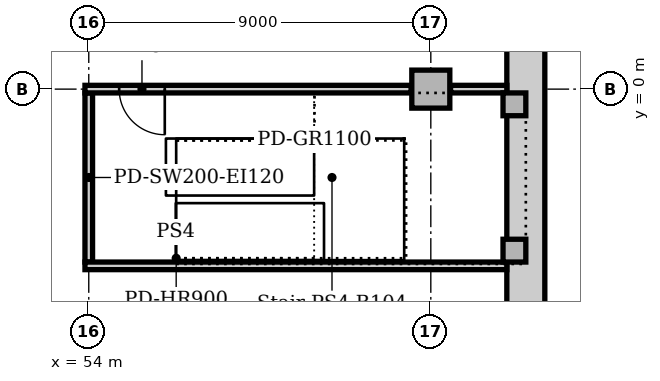
"""IFC4 building model, lengths in metres.
Left out: names, types, materials, properties, quantities, classifications, styles, units other than length and angle.
Written with IfcOpenShell. Run it as: python <this file> out.ifc"""

import sys

from ifc_helpers import new_model, si_unit, direction, frame, frame_2d, origin, origin_2d, place, context, subcontext, project, spatial, rectangle, extrude, element, fill, save


model = new_model("IFC4")
c1 = context("Model", 3, precision=1e-05, world=origin(), true_north=direction((0.0, 1.0)))
c2 = subcontext(c1, "Body", "Model", "MODEL_VIEW")
j1 = project(units=[si_unit("LENGTHUNIT", "METRE"), si_unit("PLANEANGLEUNIT", "RADIAN")], contexts=[c1])
p1 = place(None, origin())
s1 = spatial("IfcSite", under=j1, at=p1, CompositionType="ELEMENT")
p2 = place(p1, origin())
s2 = spatial("IfcBuilding", under=s1, at=p2, CompositionType="ELEMENT")
p3 = place(p2, frame((0.0, 0.0, -5.0)))
s3 = spatial("IfcBuildingStorey", under=s2, at=p3, CompositionType="ELEMENT", Elevation=-5.0)
p4 = place(p3, frame((65.5, 53.641, 0.0), z_axis=(0.0, 0.0, 1.0), x_axis=(0.0, -1.0, 0.0)))
e1 = element("IfcWall", 1, at=p4, inside=s3, PredefinedType="SOLIDWALL", context=c2, shape_type="SweptSolid", body=[
    extrude(rectangle(XDim=62.282, YDim=1.0, at=frame_2d((31.141, 0.0))), origin(), (0.0, 0.0, 1.0), 4.7),
])
p5 = place(p3, frame((63.0, 0.0, 0.0), z_axis=(0.0, 0.0, 1.0), x_axis=(1.0, 0.0, 0.0)))
e2 = element("IfcColumn", 2, at=p5, inside=s3, PredefinedType="COLUMN", context=c2, shape_type="SweptSolid", body=[
    extrude(rectangle(XDim=1.0, YDim=1.0, at=origin_2d()), origin(), (0.0, 0.0, 1.0), 4.7),
])
for number, where, z_axis, x_axis in (
    (3, (65.2, -4.25, 0.0), (0.0, 0.0, 1.0), (1.0, 0.0, 0.0)),
    (4, (65.2, -0.4, 0.0), (0.0, 0.0, 1.0), (1.0, 0.0, 0.0)),
):
    element("IfcColumn", number, at=place(p3, frame(where, z_axis=z_axis, x_axis=x_axis)), inside=s3, PredefinedType="COLUMN", context=c2, shape_type="SweptSolid", body=[
        extrude(rectangle(XDim=0.6, YDim=0.6, at=origin_2d()), origin(), (0.0, 0.0, 1.0), 5.0),
    ])
p6 = place(p3, frame((54.0, -4.55, 0.0), z_axis=(0.0, 0.0, 1.0), x_axis=(0.0, 1.0, 0.0)))
e5 = element("IfcWall", 5, at=p6, inside=s3, PredefinedType="SOLIDWALL", context=c2, shape_type="SweptSolid", body=[
    extrude(rectangle(XDim=4.45, YDim=0.2, at=frame_2d((2.225, 0.0))), origin(), (0.0, 0.0, 1.0), 4.7),
])
p7 = place(p3, frame((53.9, 0.0, 0.0), z_axis=(0.0, 0.0, 1.0), x_axis=(1.0, 0.0, 0.0)))
e6 = element("IfcWall", 6, at=p7, inside=s3, PredefinedType="SOLIDWALL", context=c2, shape_type="SweptSolid", body=[
    extrude(rectangle(XDim=8.58, YDim=0.2, at=frame_2d((4.29, 0.0))), origin(), (0.0, 0.0, 1.0), 4.7),
])
p8 = place(p7, frame((0.9, 0.0, 0.0)))
e7 = element("IfcOpeningElement", 7, at=p8, cuts=e6, PredefinedType="OPENING", context=c2, shape_type="SweptSolid", body=[
    extrude(rectangle(XDim=1.2, YDim=2.1, at=frame_2d((0.6, 1.05))), frame((0.0, 0.11, 0.0), z_axis=(0.0, -1.0, 0.0), x_axis=(1.0, 0.0, 0.0)), (0.0, 0.0, 1.0), 0.22),
])
p9 = place(p3, frame((63.52, 0.0, 0.0), z_axis=(0.0, 0.0, 1.0), x_axis=(1.0, 0.0, 0.0)))
e8 = element("IfcWall", 8, at=p9, inside=s3, PredefinedType="SOLIDWALL", context=c2, shape_type="SweptSolid", body=[
    extrude(rectangle(XDim=1.48, YDim=0.2, at=frame_2d((0.74, 0.0))), origin(), (0.0, 0.0, 1.0), 4.7),
])
p10 = place(p3, frame((53.9, -4.65, 0.0), z_axis=(0.0, 0.0, 1.0), x_axis=(1.0, 0.0, 0.0)))
e9 = element("IfcWall", 9, at=p10, inside=s3, PredefinedType="SOLIDWALL", context=c2, shape_type="SweptSolid", body=[
    extrude(rectangle(XDim=11.1, YDim=0.2, at=frame_2d((5.55, 0.0))), origin(), (0.0, 0.0, 1.0), 4.7),
])
p11 = place(p8, frame((1.2, 0.0, 0.0), z_axis=(0.0, 0.0, 1.0), x_axis=(-1.0, 0.0, 0.0)))
e10 = element("IfcDoor", 10, at=p11, inside=s3, OperationType="SINGLE_SWING_LEFT", PredefinedType="DOOR", context=c2, shape_type="SweptSolid", body=[
    extrude(rectangle(XDim=1.2, YDim=2.1, at=frame_2d((0.6, 1.05))), frame((0.0, 0.025, 0.0), z_axis=(0.0, -1.0, 0.0), x_axis=(1.0, 0.0, 0.0)), (0.0, 0.0, 1.0), 0.05),
])
fill(e7, e10)
save(model, sys.argv[1])
